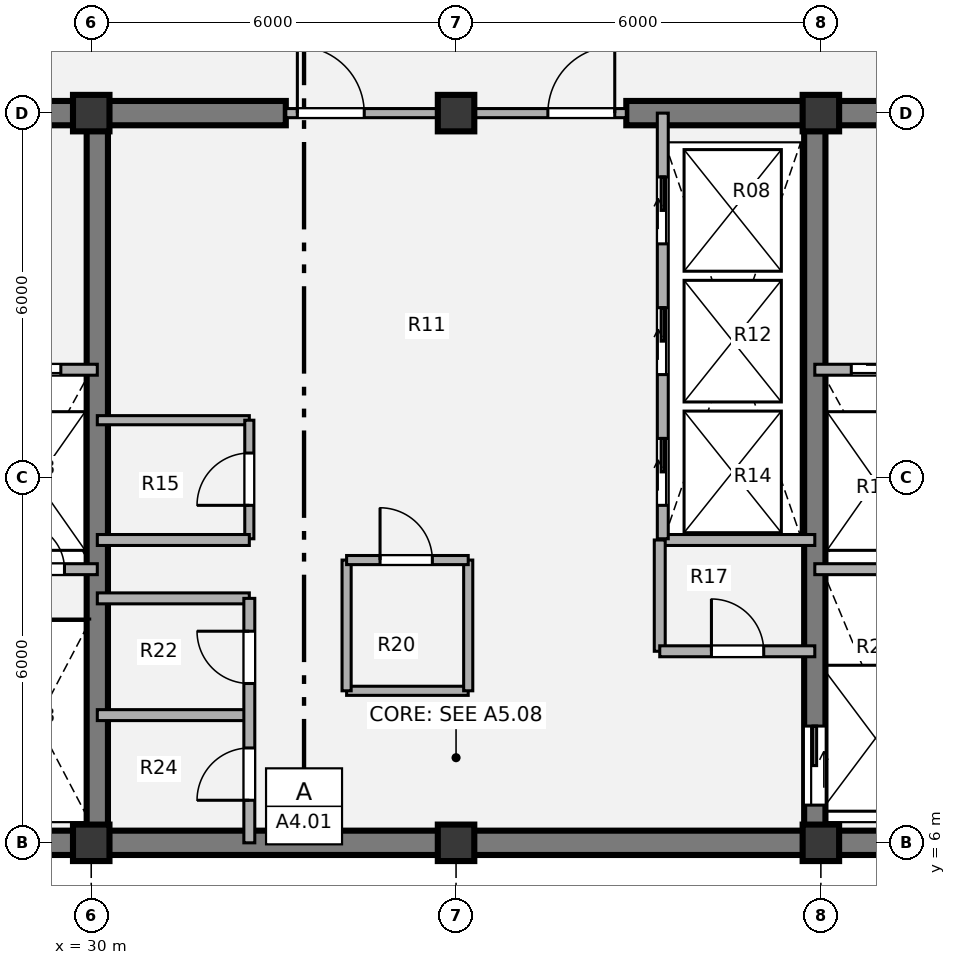
"""IFC4 building model, lengths in metres.
Left out: names, types, materials, properties, quantities, classifications, styles, units other than length and angle.
Written with IfcOpenShell. Run it as: python <this file> out.ifc"""

import sys

from ifc_helpers import new_model, si_unit, direction, frame, frame_2d, origin, origin_2d, place, context, subcontext, project, spatial, rectangle, extrude, source, transform, mapped, element, fill, save


model = new_model("IFC4")
c1 = context("Model", 3, precision=1e-05, world=origin(), true_north=direction((0.0, 1.0)))
c2 = subcontext(c1, "Body", "Model", "MODEL_VIEW")
j1 = project(units=[si_unit("LENGTHUNIT", "METRE"), si_unit("PLANEANGLEUNIT", "RADIAN")], contexts=[c1])
p1 = place(None, origin())
s1 = spatial("IfcSite", under=j1, at=p1, CompositionType="ELEMENT")
p2 = place(p1, origin())
s2 = spatial("IfcBuilding", under=s1, at=p2, CompositionType="ELEMENT")
p3 = place(p2, frame((0.0, 0.0, 218.52)))
s3 = spatial("IfcBuildingStorey", under=s2, at=p3, CompositionType="ELEMENT", Elevation=218.52)
m1 = source(origin(), c2, "Body", "SweptSolid", [
    extrude(rectangle(XDim=0.6, YDim=0.6, at=origin_2d()), origin(), (0.0, 0.0, 1.0), 4.5),
])
for number, where, z_axis, x_axis in (
    (1, (30.0, 6.0, 0.0), (0.0, 0.0, 1.0), (1.0, 0.0, 0.0)),
    (2, (36.0, 6.0, 0.0), (0.0, 0.0, 1.0), (1.0, 0.0, 0.0)),
    (3, (42.0, 6.0, 0.0), (0.0, 0.0, 1.0), (1.0, 0.0, 0.0)),
    (4, (30.0, 18.0, 0.0), (0.0, 0.0, 1.0), (1.0, 0.0, 0.0)),
    (5, (36.0, 18.0, 0.0), (0.0, 0.0, 1.0), (1.0, 0.0, 0.0)),
    (6, (42.0, 18.0, 0.0), (0.0, 0.0, 1.0), (1.0, 0.0, 0.0)),
):
    element("IfcColumn", number, at=place(p3, frame(where, z_axis=z_axis, x_axis=x_axis)), inside=s3, PredefinedType="COLUMN", context=c2, shape_type="MappedRepresentation", body=[
        mapped(m1, transform((0.0, 0.0, 0.0), x_axis=(1.0, 0.0, 0.0), y_axis=(0.0, 1.0, 0.0), z_axis=(0.0, 0.0, 1.0), scale=1.0)),
    ])
p4 = place(p3, frame((48.2, 6.0, 0.0), z_axis=(0.0, 0.0, 1.0), x_axis=(-1.0, 0.0, 0.0)))
e7 = element("IfcWall", 7, at=p4, inside=s3, PredefinedType="SHEAR", context=c2, shape_type="SweptSolid", body=[
    extrude(rectangle(XDim=24.4, YDim=0.4, at=frame_2d((12.2, 0.0))), origin(), (0.0, 0.0, 1.0), 4.5),
])
p5 = place(p3, frame((23.8, 18.0, 0.0), z_axis=(0.0, 0.0, 1.0), x_axis=(1.0, 0.0, 0.0)))
e8 = element("IfcWall", 8, at=p5, inside=s3, PredefinedType="SHEAR", context=c2, shape_type="SweptSolid", body=[
    extrude(rectangle(XDim=9.4, YDim=0.4, at=frame_2d((4.7, 0.0))), origin(), (0.0, 0.0, 1.0), 4.5),
])
p6 = place(p5, frame((2.95, 0.0, 0.0)))
e9 = element("IfcOpeningElement", 9, at=p6, cuts=e8, PredefinedType="OPENING", context=c2, shape_type="SweptSolid", body=[
    extrude(rectangle(XDim=1.1, YDim=2.1, at=origin_2d()), frame((0.55, 0.21, 1.05), z_axis=(0.0, -1.0, 0.0), x_axis=(1.0, 0.0, 0.0)), (0.0, 0.0, 1.0), 0.42),
])
p7 = place(p3, frame((38.8, 18.0, 0.0), z_axis=(0.0, 0.0, 1.0), x_axis=(1.0, 0.0, 0.0)))
e10 = element("IfcWall", 10, at=p7, inside=s3, PredefinedType="SHEAR", context=c2, shape_type="SweptSolid", body=[
    extrude(rectangle(XDim=9.4, YDim=0.4, at=frame_2d((4.7, 0.0))), origin(), (0.0, 0.0, 1.0), 4.5),
])
p8 = place(p7, frame((5.45, 0.0, 0.0)))
e11 = element("IfcOpeningElement", 11, at=p8, cuts=e10, PredefinedType="OPENING", context=c2, shape_type="SweptSolid", body=[
    extrude(rectangle(XDim=1.1, YDim=2.1, at=origin_2d()), frame((0.55, 0.21, 1.05), z_axis=(0.0, -1.0, 0.0), x_axis=(1.0, 0.0, 0.0)), (0.0, 0.0, 1.0), 0.42),
])
p9 = place(p3, frame((30.1, 6.0, 0.0), z_axis=(0.0, 0.0, 1.0), x_axis=(0.0, 1.0, 0.0)))
e12 = element("IfcWall", 12, at=p9, inside=s3, PredefinedType="SHEAR", context=c2, shape_type="SweptSolid", body=[
    extrude(rectangle(XDim=12.0, YDim=0.35, at=frame_2d((6.0, 0.0))), origin(), (0.0, 0.0, 1.0), 4.5),
])
p10 = place(p3, frame((41.9, 18.0, 0.0), z_axis=(0.0, 0.0, 1.0), x_axis=(0.0, -1.0, 0.0)))
e13 = element("IfcWall", 13, at=p10, inside=s3, PredefinedType="SHEAR", context=c2, shape_type="SweptSolid", body=[
    extrude(rectangle(XDim=12.0, YDim=0.35, at=frame_2d((6.0, 0.0))), origin(), (0.0, 0.0, 1.0), 4.5),
])
p11 = place(p10, frame((10.08, 0.0, 0.0)))
e14 = element("IfcOpeningElement", 14, at=p11, cuts=e13, PredefinedType="OPENING", context=c2, shape_type="SweptSolid", body=[
    extrude(rectangle(XDim=1.3, YDim=2.1, at=origin_2d()), frame((0.65, 0.185, 1.05), z_axis=(0.0, -1.0, 0.0), x_axis=(1.0, 0.0, 0.0)), (0.0, 0.0, 1.0), 0.37),
])
p12 = place(p3, frame((30.1, 12.95, 0.0), z_axis=(0.0, 0.0, 1.0), x_axis=(1.0, 0.0, 0.0)))
e15 = element("IfcWall", 15, at=p12, inside=s3, PredefinedType="PARTITIONING", context=c2, shape_type="SweptSolid", body=[
    extrude(rectangle(XDim=2.5, YDim=0.15, at=frame_2d((1.25, 0.0))), origin(), (0.0, 0.0, 1.0), 4.062),
])
p13 = place(p3, frame((32.6, 11.0, 0.0), z_axis=(0.0, 0.0, 1.0), x_axis=(0.0, 1.0, 0.0)))
e16 = element("IfcWall", 16, at=p13, inside=s3, PredefinedType="PARTITIONING", context=c2, shape_type="SweptSolid", body=[
    extrude(rectangle(XDim=1.95, YDim=0.15, at=frame_2d((0.975, 0.0))), origin(), (0.0, 0.0, 1.0), 4.062),
])
p14 = place(p13, frame((0.55, 0.0, 0.0)))
e17 = element("IfcOpeningElement", 17, at=p14, cuts=e16, PredefinedType="OPENING", context=c2, shape_type="SweptSolid", body=[
    extrude(rectangle(XDim=0.86, YDim=2.1, at=origin_2d()), frame((0.43, 0.085, 1.05), z_axis=(0.0, -1.0, 0.0), x_axis=(1.0, 0.0, 0.0)), (0.0, 0.0, 1.0), 0.17),
])
p15 = place(p3, frame((34.2, 8.5, 0.0), z_axis=(0.0, 0.0, 1.0), x_axis=(1.0, 0.0, 0.0)))
e18 = element("IfcWall", 18, at=p15, inside=s3, PredefinedType="PARTITIONING", context=c2, shape_type="SweptSolid", body=[
    extrude(rectangle(XDim=2.0, YDim=0.15, at=frame_2d((1.0, 0.0))), origin(), (0.0, 0.0, 1.0), 4.062),
])
p16 = place(p3, frame((34.2, 8.5, 0.0), z_axis=(0.0, 0.0, 1.0), x_axis=(0.0, 1.0, 0.0)))
e19 = element("IfcWall", 19, at=p16, inside=s3, PredefinedType="PARTITIONING", context=c2, shape_type="SweptSolid", body=[
    extrude(rectangle(XDim=2.15, YDim=0.15, at=frame_2d((1.075, 0.0))), origin(), (0.0, 0.0, 1.0), 4.062),
])
p17 = place(p3, frame((36.2, 8.5, 0.0), z_axis=(0.0, 0.0, 1.0), x_axis=(0.0, 1.0, 0.0)))
e20 = element("IfcWall", 20, at=p17, inside=s3, PredefinedType="PARTITIONING", context=c2, shape_type="SweptSolid", body=[
    extrude(rectangle(XDim=2.15, YDim=0.15, at=frame_2d((1.075, 0.0))), origin(), (0.0, 0.0, 1.0), 3.277),
])
p18 = place(p3, frame((34.2, 10.65, 0.0), z_axis=(0.0, 0.0, 1.0), x_axis=(1.0, 0.0, 0.0)))
e21 = element("IfcWall", 21, at=p18, inside=s3, PredefinedType="PARTITIONING", context=c2, shape_type="SweptSolid", body=[
    extrude(rectangle(XDim=2.0, YDim=0.15, at=frame_2d((1.0, 0.0))), origin(), (0.0, 0.0, 1.0), 4.062),
])
p19 = place(p18, frame((0.55, 0.0, 0.0)))
e22 = element("IfcOpeningElement", 22, at=p19, cuts=e21, PredefinedType="OPENING", context=c2, shape_type="SweptSolid", body=[
    extrude(rectangle(XDim=0.86, YDim=2.1, at=origin_2d()), frame((0.43, 0.085, 1.05), z_axis=(0.0, -1.0, 0.0), x_axis=(1.0, 0.0, 0.0)), (0.0, 0.0, 1.0), 0.17),
])
p20 = place(p3, frame((30.1, 10.98, 0.0), z_axis=(0.0, 0.0, 1.0), x_axis=(1.0, 0.0, 0.0)))
e23 = element("IfcWall", 23, at=p20, inside=s3, PredefinedType="PARTITIONING", context=c2, shape_type="SweptSolid", body=[
    extrude(rectangle(XDim=2.5, YDim=0.18, at=frame_2d((1.25, 0.0))), origin(), (0.0, 0.0, 1.0), 4.062),
])
p21 = place(p3, frame((39.35, 10.98, 0.0), z_axis=(0.0, 0.0, 1.0), x_axis=(1.0, 0.0, 0.0)))
e24 = element("IfcWall", 24, at=p21, inside=s3, PredefinedType="PARTITIONING", context=c2, shape_type="SweptSolid", body=[
    extrude(rectangle(XDim=2.55, YDim=0.18, at=frame_2d((1.275, 0.0))), origin(), (0.0, 0.0, 1.0), 4.062),
])
for number, where, z_axis, x_axis in (
    (25, (30.1, 8.1, 0.0), (0.0, 0.0, 1.0), (1.0, 0.0, 0.0)),
    (26, (30.1, 10.02, 0.0), (0.0, 0.0, 1.0), (1.0, 0.0, 0.0)),
):
    element("IfcWall", number, at=place(p3, frame(where, z_axis=z_axis, x_axis=x_axis)), inside=s3, PredefinedType="PARTITIONING", context=c2, shape_type="SweptSolid", body=[
        extrude(rectangle(XDim=2.5, YDim=0.18, at=frame_2d((1.25, 0.0))), origin(), (0.0, 0.0, 1.0), 4.062),
    ])
p22 = place(p3, frame((32.6, 6.0, 0.0), z_axis=(0.0, 0.0, 1.0), x_axis=(0.0, 1.0, 0.0)))
e27 = element("IfcWall", 27, at=p22, inside=s3, PredefinedType="PARTITIONING", context=c2, shape_type="SweptSolid", body=[
    extrude(rectangle(XDim=4.02, YDim=0.18, at=frame_2d((2.01, 0.0))), origin(), (0.0, 0.0, 1.0), 4.062),
])
p23 = place(p22, frame((0.7, 0.0, 0.0)))
e28 = element("IfcOpeningElement", 28, at=p23, cuts=e27, PredefinedType="OPENING", context=c2, shape_type="SweptSolid", body=[
    extrude(rectangle(XDim=0.86, YDim=2.1, at=origin_2d()), frame((0.43, 0.1, 1.05), z_axis=(0.0, -1.0, 0.0), x_axis=(1.0, 0.0, 0.0)), (0.0, 0.0, 1.0), 0.2),
])
p24 = place(p22, frame((2.62, 0.0, 0.0)))
e29 = element("IfcOpeningElement", 29, at=p24, cuts=e27, PredefinedType="OPENING", context=c2, shape_type="SweptSolid", body=[
    extrude(rectangle(XDim=0.86, YDim=2.1, at=origin_2d()), frame((0.43, 0.1, 1.05), z_axis=(0.0, -1.0, 0.0), x_axis=(1.0, 0.0, 0.0)), (0.0, 0.0, 1.0), 0.2),
])
p25 = place(p3, frame((39.35, 9.15, 0.0), z_axis=(0.0, 0.0, 1.0), x_axis=(0.0, 1.0, 0.0)))
e30 = element("IfcWall", 30, at=p25, inside=s3, PredefinedType="PARTITIONING", context=c2, shape_type="SweptSolid", body=[
    extrude(rectangle(XDim=1.83, YDim=0.18, at=frame_2d((0.915, 0.0))), origin(), (0.0, 0.0, 1.0), 4.062),
])
p26 = place(p3, frame((39.35, 9.15, 0.0), z_axis=(0.0, 0.0, 1.0), x_axis=(1.0, 0.0, 0.0)))
e31 = element("IfcWall", 31, at=p26, inside=s3, PredefinedType="PARTITIONING", context=c2, shape_type="SweptSolid", body=[
    extrude(rectangle(XDim=2.55, YDim=0.18, at=frame_2d((1.275, 0.0))), origin(), (0.0, 0.0, 1.0), 4.062),
])
p27 = place(p26, frame((0.85, 0.0, 0.0)))
e32 = element("IfcOpeningElement", 32, at=p27, cuts=e31, PredefinedType="OPENING", context=c2, shape_type="SweptSolid", body=[
    extrude(rectangle(XDim=0.86, YDim=2.1, at=origin_2d()), frame((0.43, 0.1, 1.05), z_axis=(0.0, -1.0, 0.0), x_axis=(1.0, 0.0, 0.0)), (0.0, 0.0, 1.0), 0.2),
])
p28 = place(p3, frame((33.2, 18.0, 0.0), z_axis=(0.0, 0.0, 1.0), x_axis=(1.0, 0.0, 0.0)))
e33 = element("IfcWall", 33, at=p28, inside=s3, PredefinedType="PARTITIONING", context=c2, shape_type="SweptSolid", body=[
    extrude(rectangle(XDim=5.6, YDim=0.15, at=frame_2d((2.8, 0.0))), origin(), (0.0, 0.0, 1.0), 3.077),
])
p29 = place(p28, frame((0.19, 0.0, 0.0)))
e34 = element("IfcOpeningElement", 34, at=p29, cuts=e33, PredefinedType="OPENING", context=c2, shape_type="SweptSolid", body=[
    extrude(rectangle(XDim=1.1, YDim=2.1, at=origin_2d()), frame((0.55, 0.085, 1.05), z_axis=(0.0, -1.0, 0.0), x_axis=(1.0, 0.0, 0.0)), (0.0, 0.0, 1.0), 0.17),
])
p30 = place(p28, frame((4.31, 0.0, 0.0)))
e35 = element("IfcOpeningElement", 35, at=p30, cuts=e33, PredefinedType="OPENING", context=c2, shape_type="SweptSolid", body=[
    extrude(rectangle(XDim=1.1, YDim=2.1, at=origin_2d()), frame((0.55, 0.085, 1.05), z_axis=(0.0, -1.0, 0.0), x_axis=(1.0, 0.0, 0.0)), (0.0, 0.0, 1.0), 0.17),
])
p31 = place(p3, frame((24.0, 13.78, 0.0), z_axis=(0.0, 0.0, 1.0), x_axis=(1.0, 0.0, 0.0)))
e36 = element("IfcWall", 36, at=p31, inside=s3, PredefinedType="PARTITIONING", context=c2, shape_type="SweptSolid", body=[
    extrude(rectangle(XDim=6.1, YDim=0.18, at=frame_2d((3.05, 0.0))), origin(), (0.0, 0.0, 1.0), 4.062),
])
p32 = place(p31, frame((1.15, 0.0, 0.0)))
e37 = element("IfcOpeningElement", 37, at=p32, cuts=e36, PredefinedType="OPENING", context=c2, shape_type="SweptSolid", body=[
    extrude(rectangle(XDim=1.1, YDim=2.1, at=origin_2d()), frame((0.55, 0.1, 1.05), z_axis=(0.0, -1.0, 0.0), x_axis=(1.0, 0.0, 0.0)), (0.0, 0.0, 1.0), 0.2),
])
p33 = place(p31, frame((4.4, 0.0, 0.0)))
e38 = element("IfcOpeningElement", 38, at=p33, cuts=e36, PredefinedType="OPENING", context=c2, shape_type="SweptSolid", body=[
    extrude(rectangle(XDim=1.1, YDim=2.1, at=origin_2d()), frame((0.55, 0.1, 1.05), z_axis=(0.0, -1.0, 0.0), x_axis=(1.0, 0.0, 0.0)), (0.0, 0.0, 1.0), 0.2),
])
p34 = place(p3, frame((28.15, 10.5, 0.0), z_axis=(0.0, 0.0, 1.0), x_axis=(1.0, 0.0, 0.0)))
e39 = element("IfcWall", 39, at=p34, inside=s3, PredefinedType="PARTITIONING", context=c2, shape_type="SweptSolid", body=[
    extrude(rectangle(XDim=1.95, YDim=0.18, at=frame_2d((0.975, 0.0))), origin(), (0.0, 0.0, 1.0), 4.062),
])
p35 = place(p34, frame((0.65, 0.0, 0.0)))
e40 = element("IfcOpeningElement", 40, at=p35, cuts=e39, PredefinedType="OPENING", context=c2, shape_type="SweptSolid", body=[
    extrude(rectangle(XDim=0.76, YDim=2.05, at=origin_2d()), frame((0.38, 0.1, 1.025), z_axis=(0.0, -1.0, 0.0), x_axis=(1.0, 0.0, 0.0)), (0.0, 0.0, 1.0), 0.2),
])
p36 = place(p3, frame((41.9, 13.78, 0.0), z_axis=(0.0, 0.0, 1.0), x_axis=(1.0, 0.0, 0.0)))
e41 = element("IfcWall", 41, at=p36, inside=s3, PredefinedType="PARTITIONING", context=c2, shape_type="SweptSolid", body=[
    extrude(rectangle(XDim=6.1, YDim=0.18, at=frame_2d((3.05, 0.0))), origin(), (0.0, 0.0, 1.0), 4.062),
])
p37 = place(p36, frame((0.6, 0.0, 0.0)))
e42 = element("IfcOpeningElement", 42, at=p37, cuts=e41, PredefinedType="OPENING", context=c2, shape_type="SweptSolid", body=[
    extrude(rectangle(XDim=1.1, YDim=2.1, at=origin_2d()), frame((0.55, 0.1, 1.05), z_axis=(0.0, -1.0, 0.0), x_axis=(1.0, 0.0, 0.0)), (0.0, 0.0, 1.0), 0.2),
])
p38 = place(p36, frame((3.8, 0.0, 0.0)))
e43 = element("IfcOpeningElement", 43, at=p38, cuts=e41, PredefinedType="OPENING", context=c2, shape_type="SweptSolid", body=[
    extrude(rectangle(XDim=1.1, YDim=2.1, at=origin_2d()), frame((0.55, 0.1, 1.05), z_axis=(0.0, -1.0, 0.0), x_axis=(1.0, 0.0, 0.0)), (0.0, 0.0, 1.0), 0.2),
])
p39 = place(p3, frame((41.9, 10.5, 0.0), z_axis=(0.0, 0.0, 1.0), x_axis=(1.0, 0.0, 0.0)))
e44 = element("IfcWall", 44, at=p39, inside=s3, PredefinedType="PARTITIONING", context=c2, shape_type="SweptSolid", body=[
    extrude(rectangle(XDim=1.95, YDim=0.18, at=frame_2d((0.975, 0.0))), origin(), (0.0, 0.0, 1.0), 4.062),
])
p40 = place(p3, frame((39.4, 11.0, 0.0), z_axis=(0.0, 0.0, 1.0), x_axis=(0.0, 1.0, 0.0)))
e45 = element("IfcWall", 45, at=p40, inside=s3, PredefinedType="PARTITIONING", context=c2, shape_type="SweptSolid", body=[
    extrude(rectangle(XDim=7.0, YDim=0.18, at=frame_2d((3.5, 0.0))), origin(), (0.0, 0.0, 1.0), 4.062),
])
p41 = place(p40, frame((0.55, 0.0, 0.0)))
e46 = element("IfcOpeningElement", 46, at=p41, cuts=e45, PredefinedType="OPENING", context=c2, shape_type="SweptSolid", body=[
    extrude(rectangle(XDim=1.1, YDim=2.1, at=origin_2d()), frame((0.55, 0.1, 1.05), z_axis=(0.0, -1.0, 0.0), x_axis=(1.0, 0.0, 0.0)), (0.0, 0.0, 1.0), 0.2),
])
p42 = place(p40, frame((2.7, 0.0, 0.0)))
e47 = element("IfcOpeningElement", 47, at=p42, cuts=e45, PredefinedType="OPENING", context=c2, shape_type="SweptSolid", body=[
    extrude(rectangle(XDim=1.1, YDim=2.1, at=origin_2d()), frame((0.55, 0.1, 1.05), z_axis=(0.0, -1.0, 0.0), x_axis=(1.0, 0.0, 0.0)), (0.0, 0.0, 1.0), 0.2),
])
p43 = place(p40, frame((4.85, 0.0, 0.0)))
e48 = element("IfcOpeningElement", 48, at=p43, cuts=e45, PredefinedType="OPENING", context=c2, shape_type="SweptSolid", body=[
    extrude(rectangle(XDim=1.1, YDim=2.1, at=origin_2d()), frame((0.55, 0.1, 1.05), z_axis=(0.0, -1.0, 0.0), x_axis=(1.0, 0.0, 0.0)), (0.0, 0.0, 1.0), 0.2),
])
m2 = source(origin(), c2, "Body", "SweptSolid", [
    extrude(rectangle(XDim=0.86, YDim=2.1, at=origin_2d()), frame((0.43, 0.025, 1.05), z_axis=(0.0, -1.0, 0.0), x_axis=(1.0, 0.0, 0.0)), (0.0, 0.0, 1.0), 0.05),
])
p44 = place(p14, origin())
e49 = element("IfcDoor", 49, at=p44, inside=s3, OperationType="SINGLE_SWING_LEFT", PredefinedType="DOOR", context=c2, shape_type="MappedRepresentation", body=[
    mapped(m2, transform((0.0, 0.0, 0.0), x_axis=(1.0, 0.0, 0.0), y_axis=(0.0, 1.0, 0.0), z_axis=(0.0, 0.0, 1.0), scale=1.0)),
])
fill(e17, e49)
p45 = place(p19, origin())
e50 = element("IfcDoor", 50, at=p45, inside=s3, OperationType="SINGLE_SWING_LEFT", PredefinedType="DOOR", context=c2, shape_type="MappedRepresentation", body=[
    mapped(m2, transform((0.0, 0.0, 0.0), x_axis=(1.0, 0.0, 0.0), y_axis=(0.0, 1.0, 0.0), z_axis=(0.0, 0.0, 1.0), scale=1.0)),
])
fill(e22, e50)
p46 = place(p23, origin())
e51 = element("IfcDoor", 51, at=p46, inside=s3, OperationType="SINGLE_SWING_LEFT", PredefinedType="DOOR", context=c2, shape_type="MappedRepresentation", body=[
    mapped(m2, transform((0.0, 0.0, 0.0), x_axis=(1.0, 0.0, 0.0), y_axis=(0.0, 1.0, 0.0), z_axis=(0.0, 0.0, 1.0), scale=1.0)),
])
fill(e28, e51)
p47 = place(p24, origin())
e52 = element("IfcDoor", 52, at=p47, inside=s3, OperationType="SINGLE_SWING_RIGHT", PredefinedType="DOOR", context=c2, shape_type="MappedRepresentation", body=[
    mapped(m2, transform((0.0, 0.0, 0.0), x_axis=(1.0, 0.0, 0.0), y_axis=(0.0, 1.0, 0.0), z_axis=(0.0, 0.0, 1.0), scale=1.0)),
])
fill(e29, e52)
p48 = place(p27, origin())
e53 = element("IfcDoor", 53, at=p48, inside=s3, OperationType="SINGLE_SWING_LEFT", PredefinedType="DOOR", context=c2, shape_type="MappedRepresentation", body=[
    mapped(m2, transform((0.0, 0.0, 0.0), x_axis=(1.0, 0.0, 0.0), y_axis=(0.0, 1.0, 0.0), z_axis=(0.0, 0.0, 1.0), scale=1.0)),
])
fill(e32, e53)
m3 = source(origin(), c2, "Body", "SweptSolid", [
    extrude(rectangle(XDim=1.1, YDim=2.1, at=origin_2d()), frame((0.55, 0.025, 1.05), z_axis=(0.0, -1.0, 0.0), x_axis=(1.0, 0.0, 0.0)), (0.0, 0.0, 1.0), 0.05),
])
p49 = place(p29, origin())
e54 = element("IfcDoor", 54, at=p49, inside=s3, OperationType="SINGLE_SWING_LEFT", PredefinedType="DOOR", context=c2, shape_type="MappedRepresentation", body=[
    mapped(m3, transform((0.0, 0.0, 0.0), x_axis=(1.0, 0.0, 0.0), y_axis=(0.0, 1.0, 0.0), z_axis=(0.0, 0.0, 1.0), scale=1.0)),
])
fill(e34, e54)
p50 = place(p30, origin())
e55 = element("IfcDoor", 55, at=p50, inside=s3, OperationType="SINGLE_SWING_RIGHT", PredefinedType="DOOR", context=c2, shape_type="MappedRepresentation", body=[
    mapped(m3, transform((0.0, 0.0, 0.0), x_axis=(1.0, 0.0, 0.0), y_axis=(0.0, 1.0, 0.0), z_axis=(0.0, 0.0, 1.0), scale=1.0)),
])
fill(e35, e55)
m4 = source(origin(), c2, "Body", "SweptSolid", [
    extrude(rectangle(XDim=1.1, YDim=2.1, at=origin_2d()), frame((0.55, 0.025, 1.05), z_axis=(0.0, -1.0, 0.0), x_axis=(1.0, 0.0, 0.0)), (0.0, 0.0, 1.0), 0.05),
])
p51 = place(p33, origin())
e56 = element("IfcDoor", 56, at=p51, inside=s3, OperationType="SLIDING_TO_LEFT", PredefinedType="DOOR", context=c2, shape_type="MappedRepresentation", body=[
    mapped(m4, transform((0.0, 0.0, 0.0), x_axis=(1.0, 0.0, 0.0), y_axis=(0.0, 1.0, 0.0), z_axis=(0.0, 0.0, 1.0), scale=1.0)),
])
fill(e38, e56)
m5 = source(origin(), c2, "Body", "SweptSolid", [
    extrude(rectangle(XDim=0.76, YDim=2.05, at=origin_2d()), frame((0.38, 0.025, 1.025), z_axis=(0.0, -1.0, 0.0), x_axis=(1.0, 0.0, 0.0)), (0.0, 0.0, 1.0), 0.05),
])
p52 = place(p35, origin())
e57 = element("IfcDoor", 57, at=p52, inside=s3, OperationType="SINGLE_SWING_LEFT", PredefinedType="DOOR", context=c2, shape_type="MappedRepresentation", body=[
    mapped(m5, transform((0.0, 0.0, 0.0), x_axis=(1.0, 0.0, 0.0), y_axis=(0.0, 1.0, 0.0), z_axis=(0.0, 0.0, 1.0), scale=1.0)),
])
fill(e40, e57)
p53 = place(p37, origin())
e58 = element("IfcDoor", 58, at=p53, inside=s3, OperationType="SLIDING_TO_RIGHT", PredefinedType="DOOR", context=c2, shape_type="MappedRepresentation", body=[
    mapped(m4, transform((0.0, 0.0, 0.0), x_axis=(1.0, 0.0, 0.0), y_axis=(0.0, 1.0, 0.0), z_axis=(0.0, 0.0, 1.0), scale=1.0)),
])
fill(e42, e58)
m6 = source(origin(), c2, "Body", "SweptSolid", [
    extrude(rectangle(XDim=1.3, YDim=2.1, at=origin_2d()), frame((0.65, 0.025, 1.05), z_axis=(0.0, -1.0, 0.0), x_axis=(1.0, 0.0, 0.0)), (0.0, 0.0, 1.0), 0.05),
])
p54 = place(p11, origin())
e59 = element("IfcDoor", 59, at=p54, inside=s3, OperationType="SLIDING_TO_LEFT", PredefinedType="DOOR", context=c2, shape_type="MappedRepresentation", body=[
    mapped(m6, transform((0.0, 0.0, 0.0), x_axis=(1.0, 0.0, 0.0), y_axis=(0.0, 1.0, 0.0), z_axis=(0.0, 0.0, 1.0), scale=1.0)),
])
fill(e14, e59)
p55 = place(p41, origin())
e60 = element("IfcDoor", 60, at=p55, inside=s3, OperationType="SLIDING_TO_RIGHT", PredefinedType="DOOR", context=c2, shape_type="MappedRepresentation", body=[
    mapped(m4, transform((0.0, 0.0, 0.0), x_axis=(1.0, 0.0, 0.0), y_axis=(0.0, 1.0, 0.0), z_axis=(0.0, 0.0, 1.0), scale=1.0)),
])
fill(e46, e60)
p56 = place(p42, origin())
e61 = element("IfcDoor", 61, at=p56, inside=s3, OperationType="SLIDING_TO_RIGHT", PredefinedType="DOOR", context=c2, shape_type="MappedRepresentation", body=[
    mapped(m4, transform((0.0, 0.0, 0.0), x_axis=(1.0, 0.0, 0.0), y_axis=(0.0, 1.0, 0.0), z_axis=(0.0, 0.0, 1.0), scale=1.0)),
])
fill(e47, e61)
p57 = place(p43, origin())
e62 = element("IfcDoor", 62, at=p57, inside=s3, OperationType="SLIDING_TO_RIGHT", PredefinedType="DOOR", context=c2, shape_type="MappedRepresentation", body=[
    mapped(m4, transform((0.0, 0.0, 0.0), x_axis=(1.0, 0.0, 0.0), y_axis=(0.0, 1.0, 0.0), z_axis=(0.0, 0.0, 1.0), scale=1.0)),
])
fill(e48, e62)
save(model, sys.argv[1])
